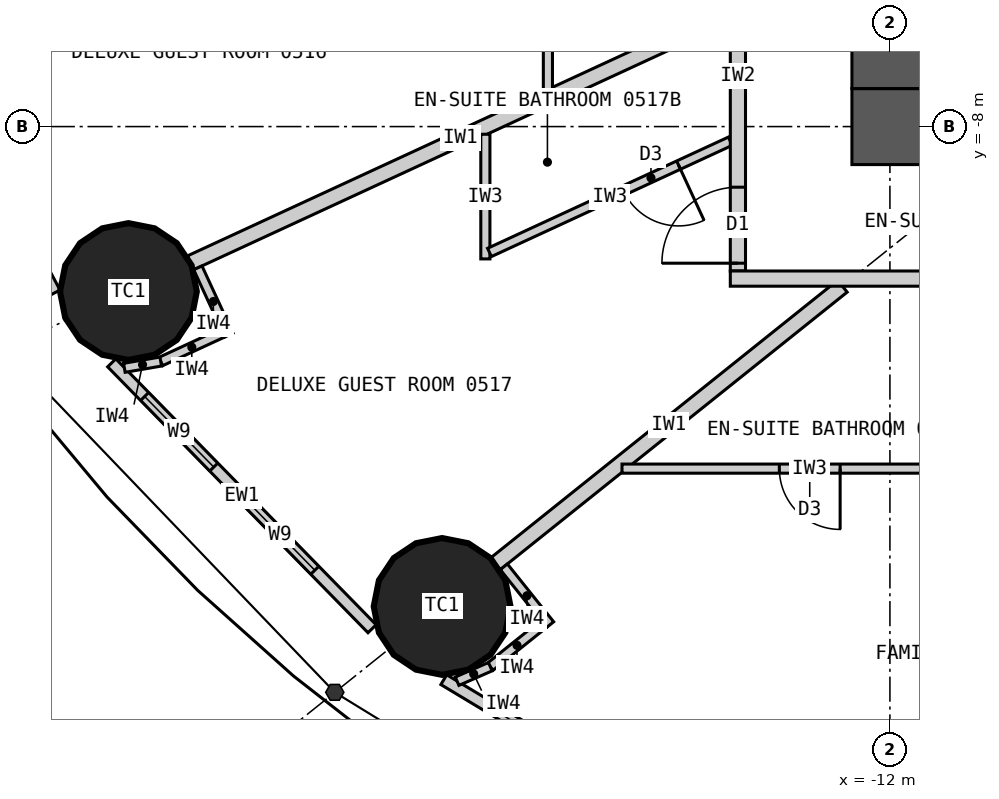
"""IFC4 building model, lengths in metres.
Left out: names, types, materials, properties, quantities, classifications, styles, units other than length and angle.
Written with IfcOpenShell. Run it as: python <this file> out.ifc"""

import sys

from ifc_helpers import new_model, si_unit, direction, frame, frame_2d, origin, origin_2d, place, context, subcontext, project, spatial, rectangle, circle, extrude, element, fill, save


model = new_model("IFC4")
c1 = context("Model", 3, precision=1e-05, world=origin(), true_north=direction((0.0, 1.0)))
c2 = subcontext(c1, "Body", "Model", "MODEL_VIEW")
j1 = project(units=[si_unit("LENGTHUNIT", "METRE"), si_unit("PLANEANGLEUNIT", "RADIAN")], contexts=[c1])
p1 = place(None, origin())
s1 = spatial("IfcSite", under=j1, at=p1, CompositionType="ELEMENT")
p2 = place(p1, origin())
s2 = spatial("IfcBuilding", under=s1, at=p2, CompositionType="ELEMENT")
p3 = place(p2, frame((0.0, 0.0, 29.4)))
s3 = spatial("IfcBuildingStorey", under=s2, at=p3, CompositionType="ELEMENT", Elevation=29.4)
for number, where, z_axis, x_axis in (
    (1, (-22.019, -10.17, 0.0), (0.0, 0.0, 1.0), (1.0, 0.0, 0.0)),
    (2, (-17.892, -14.313, 0.0), (0.0, 0.0, 1.0), (1.0, 0.0, 0.0)),
):
    element("IfcColumn", number, at=place(p3, frame(where, z_axis=z_axis, x_axis=x_axis)), inside=s3, PredefinedType="COLUMN", context=c2, shape_type="SweptSolid", body=[
        extrude(circle(Radius=0.9, at=origin_2d()), origin(), (0.0, 0.0, 1.0), 3.3),
    ])
p4 = place(p3, frame((12.5, -8.0, 0.0), z_axis=(0.0, 0.0, 1.0), x_axis=(-1.0, 0.0, 0.0)))
e3 = element("IfcWall", 3, at=p4, inside=s3, PredefinedType="SHEAR", context=c2, shape_type="SweptSolid", body=[
    extrude(rectangle(XDim=25.0, YDim=1.0, at=frame_2d((12.5, 0.0))), origin(), (0.0, 0.0, 1.0), 3.3),
])
p5 = place(p4, frame((11.2, 0.0, 0.0)))
e4 = element("IfcOpeningElement", 4, at=p5, cuts=e3, PredefinedType="OPENING", context=c2, shape_type="SweptSolid", body=[
    extrude(rectangle(XDim=1.2, YDim=2.2, at=frame_2d((0.6, 1.1))), frame((0.0, 0.51, 0.0), z_axis=(0.0, -1.0, 0.0), x_axis=(1.0, 0.0, 0.0)), (0.0, 0.0, 1.0), 1.02),
])
p6 = place(p4, frame((18.8, 0.0, 0.0)))
e5 = element("IfcOpeningElement", 5, at=p6, cuts=e3, PredefinedType="OPENING", context=c2, shape_type="SweptSolid", body=[
    extrude(rectangle(XDim=0.9, YDim=2.2, at=frame_2d((0.45, 1.1))), frame((0.0, 0.51, 0.0), z_axis=(0.0, -1.0, 0.0), x_axis=(1.0, 0.0, 0.0)), (0.0, 0.0, 1.0), 1.02),
])
p7 = place(p3, frame((-12.0, 7.5, 0.0), z_axis=(0.0, 0.0, 1.0), x_axis=(0.0, -1.0, 0.0)))
e6 = element("IfcWall", 6, at=p7, inside=s3, PredefinedType="SHEAR", context=c2, shape_type="SweptSolid", body=[
    extrude(rectangle(XDim=15.0, YDim=1.0, at=frame_2d((7.5, 0.0))), origin(), (0.0, 0.0, 1.0), 3.3),
])
p8 = place(p7, frame((6.6, 0.0, 0.0)))
e7 = element("IfcOpeningElement", 7, at=p8, cuts=e6, PredefinedType="OPENING", context=c2, shape_type="SweptSolid", body=[
    extrude(rectangle(XDim=1.8, YDim=2.2, at=frame_2d((0.9, 1.1))), frame((0.0, 0.51, 0.0), z_axis=(0.0, -1.0, 0.0), x_axis=(1.0, 0.0, 0.0)), (0.0, 0.0, 1.0), 1.02),
])
p9 = place(p3, frame((-25.139, -6.113, 0.0), z_axis=(0.0, 0.0, 1.0), x_axis=(0.467303182954, -0.884097129959, 0.0)))
e8 = element("IfcWall", 8, at=p9, inside=s3, PredefinedType="ELEMENTEDWALL", context=c2, shape_type="SweptSolid", body=[
    extrude(rectangle(XDim=4.606, YDim=0.15, at=frame_2d((2.303, 0.0))), origin(), (0.0, 0.0, 1.0), 3.12),
])
p10 = place(p9, frame((0.531, 0.0, 0.9)))
e9 = element("IfcOpeningElement", 9, at=p10, cuts=e8, PredefinedType="OPENING", context=c2, shape_type="SweptSolid", body=[
    extrude(rectangle(XDim=1.3, YDim=1.9, at=frame_2d((0.65, 0.95))), frame((0.0, 0.085, 0.0), z_axis=(0.0, -1.0, 0.0), x_axis=(1.0, 0.0, 0.0)), (0.0, 0.0, 1.0), 0.17),
])
p11 = place(p9, frame((2.432, 0.0, 0.9)))
e10 = element("IfcOpeningElement", 10, at=p11, cuts=e8, PredefinedType="OPENING", context=c2, shape_type="SweptSolid", body=[
    extrude(rectangle(XDim=1.3, YDim=1.9, at=frame_2d((0.65, 0.95))), frame((0.0, 0.085, 0.0), z_axis=(0.0, -1.0, 0.0), x_axis=(1.0, 0.0, 0.0)), (0.0, 0.0, 1.0), 0.17),
])
p12 = place(p3, frame((-22.239, -11.108, 0.0), z_axis=(0.0, 0.0, 1.0), x_axis=(0.699612594083, -0.714522370679, 0.0)))
e11 = element("IfcWall", 11, at=p12, inside=s3, PredefinedType="ELEMENTEDWALL", context=c2, shape_type="SweptSolid", body=[
    extrude(rectangle(XDim=4.896, YDim=0.15, at=frame_2d((2.448, 0.0))), origin(), (0.0, 0.0, 1.0), 3.12),
])
p13 = place(p12, frame((0.619, 0.0, 0.9)))
e12 = element("IfcOpeningElement", 12, at=p13, cuts=e11, PredefinedType="OPENING", context=c2, shape_type="SweptSolid", body=[
    extrude(rectangle(XDim=1.3, YDim=1.9, at=frame_2d((0.65, 0.95))), frame((0.0, 0.085, 0.0), z_axis=(0.0, -1.0, 0.0), x_axis=(1.0, 0.0, 0.0)), (0.0, 0.0, 1.0), 0.17),
])
p14 = place(p12, frame((2.519, 0.0, 0.9)))
e13 = element("IfcOpeningElement", 13, at=p14, cuts=e11, PredefinedType="OPENING", context=c2, shape_type="SweptSolid", body=[
    extrude(rectangle(XDim=1.3, YDim=1.9, at=frame_2d((0.65, 0.95))), frame((0.0, 0.085, 0.0), z_axis=(0.0, -1.0, 0.0), x_axis=(1.0, 0.0, 0.0)), (0.0, 0.0, 1.0), 0.17),
])
p15 = place(p3, frame((-17.869, -15.277, 0.0), z_axis=(0.0, 0.0, 1.0), x_axis=(0.856958191554, -0.515385931054, 0.0)))
e14 = element("IfcWall", 14, at=p15, inside=s3, PredefinedType="ELEMENTEDWALL", context=c2, shape_type="SweptSolid", body=[
    extrude(rectangle(XDim=5.201, YDim=0.15, at=frame_2d((2.601, 0.0))), origin(), (0.0, 0.0, 1.0), 3.12),
])
p16 = place(p15, frame((0.776, 0.0, 0.9)))
e15 = element("IfcOpeningElement", 15, at=p16, cuts=e14, PredefinedType="OPENING", context=c2, shape_type="SweptSolid", body=[
    extrude(rectangle(XDim=1.3, YDim=1.9, at=frame_2d((0.65, 0.95))), frame((0.0, 0.085, 0.0), z_axis=(0.0, -1.0, 0.0), x_axis=(1.0, 0.0, 0.0)), (0.0, 0.0, 1.0), 0.17),
])
p17 = place(p15, frame((2.676, 0.0, 0.9)))
e16 = element("IfcOpeningElement", 16, at=p17, cuts=e14, PredefinedType="OPENING", context=c2, shape_type="SweptSolid", body=[
    extrude(rectangle(XDim=1.3, YDim=1.9, at=frame_2d((0.65, 0.95))), frame((0.0, 0.085, 0.0), z_axis=(0.0, -1.0, 0.0), x_axis=(1.0, 0.0, 0.0)), (0.0, 0.0, 1.0), 0.17),
])
p18 = place(p3, frame((-14.1, -6.512, 0.0), z_axis=(0.0, 0.0, 1.0), x_axis=(-0.907842433118, -0.41931147925, 0.0)))
e17 = element("IfcWall", 17, at=p18, inside=s3, PredefinedType="PARTITIONING", context=c2, shape_type="SweptSolid", body=[
    extrude(rectangle(XDim=7.823, YDim=0.2, at=frame_2d((3.912, 0.0))), origin(), (0.0, 0.0, 1.0), 2.32),
])
p19 = place(p3, frame((-12.625, -10.1, 0.0), z_axis=(0.0, 0.0, 1.0), x_axis=(-0.780872884676, -0.624689953479, 0.0)))
e18 = element("IfcWall", 18, at=p19, inside=s3, PredefinedType="PARTITIONING", context=c2, shape_type="SweptSolid", body=[
    extrude(rectangle(XDim=5.845, YDim=0.2, at=frame_2d((2.922, 0.0))), origin(), (0.0, 0.0, 1.0), 2.32),
])
p20 = place(p3, frame((-16.5, -7.521, 0.0), z_axis=(0.0, 0.0, 1.0), x_axis=(0.0, 1.0, 0.0)))
e19 = element("IfcWall", 19, at=p20, inside=s3, PredefinedType="PARTITIONING", context=c2, shape_type="SweptSolid", body=[
    extrude(rectangle(XDim=2.749, YDim=0.12, at=frame_2d((1.374, 0.0))), origin(), (0.0, 0.0, 1.0), 3.12),
])
p21 = place(p3, frame((-17.323, -8.101, 0.0), z_axis=(0.0, 0.0, 1.0), x_axis=(0.0, -1.0, 0.0)))
e20 = element("IfcWall", 20, at=p21, inside=s3, PredefinedType="PARTITIONING", context=c2, shape_type="SweptSolid", body=[
    extrude(rectangle(XDim=1.64, YDim=0.12, at=frame_2d((0.82, 0.0))), origin(), (0.0, 0.0, 1.0), 3.12),
])
p22 = place(p3, frame((-14.1, -8.193, 0.0), z_axis=(0.0, 0.0, 1.0), x_axis=(-0.907836493557, -0.419324338628, 0.0)))
e21 = element("IfcWall", 21, at=p22, inside=s3, PredefinedType="PARTITIONING", context=c2, shape_type="SweptSolid", body=[
    extrude(rectangle(XDim=3.49, YDim=0.12, at=frame_2d((1.745, 0.0))), origin(), (0.0, 0.0, 1.0), 3.12),
])
p23 = place(p22, frame((0.75, 0.0, 0.0)))
e22 = element("IfcOpeningElement", 22, at=p23, cuts=e21, PredefinedType="OPENING", context=c2, shape_type="SweptSolid", body=[
    extrude(rectangle(XDim=0.8, YDim=2.1, at=frame_2d((0.4, 1.05))), frame((0.0, 0.07, 0.0), z_axis=(0.0, -1.0, 0.0), x_axis=(1.0, 0.0, 0.0)), (0.0, 0.0, 1.0), 0.14),
])
p24 = place(p3, frame((-15.525, -12.5, 0.0), z_axis=(0.0, 0.0, 1.0), x_axis=(1.0, 0.0, 0.0)))
e23 = element("IfcWall", 23, at=p24, inside=s3, PredefinedType="PARTITIONING", context=c2, shape_type="SweptSolid", body=[
    extrude(rectangle(XDim=4.94, YDim=0.12, at=frame_2d((2.47, 0.0))), origin(), (0.0, 0.0, 1.0), 3.12),
])
p25 = place(p24, frame((2.07, 0.0, 0.0)))
e24 = element("IfcOpeningElement", 24, at=p25, cuts=e23, PredefinedType="OPENING", context=c2, shape_type="SweptSolid", body=[
    extrude(rectangle(XDim=0.8, YDim=2.1, at=frame_2d((0.4, 1.05))), frame((0.0, 0.07, 0.0), z_axis=(0.0, -1.0, 0.0), x_axis=(1.0, 0.0, 0.0)), (0.0, 0.0, 1.0), 0.14),
])
p26 = place(p3, frame((-14.0, -4.772, 0.0), z_axis=(0.0, 0.0, 1.0), x_axis=(0.0, -1.0, 0.0)))
e25 = element("IfcWall", 25, at=p26, inside=s3, PredefinedType="PARTITIONING", context=c2, shape_type="SweptSolid", body=[
    extrude(rectangle(XDim=5.127, YDim=0.2, at=frame_2d((2.564, 0.0))), origin(), (0.0, 0.0, 1.0), 3.12),
])
p27 = place(p26, frame((4.025, 0.0, 0.0)))
e26 = element("IfcOpeningElement", 26, at=p27, cuts=e25, PredefinedType="OPENING", context=c2, shape_type="SweptSolid", body=[
    extrude(rectangle(XDim=1.0, YDim=2.2, at=frame_2d((0.5, 1.1))), frame((0.0, 0.11, 0.0), z_axis=(0.0, -1.0, 0.0), x_axis=(1.0, 0.0, 0.0)), (0.0, 0.0, 1.0), 0.22),
])
p28 = place(p3, frame((-3.499, -10.0, 0.0), z_axis=(0.0, 0.0, 1.0), x_axis=(-1.0, 0.0, 0.0)))
e27 = element("IfcWall", 27, at=p28, inside=s3, PredefinedType="PARTITIONING", context=c2, shape_type="SweptSolid", body=[
    extrude(rectangle(XDim=10.602, YDim=0.2, at=frame_2d((5.301, 0.0))), origin(), (0.0, 0.0, 1.0), 3.12),
])
p29 = place(p28, frame((4.846, 0.0, 0.0)))
e28 = element("IfcOpeningElement", 28, at=p29, cuts=e27, PredefinedType="OPENING", context=c2, shape_type="SweptSolid", body=[
    extrude(rectangle(XDim=1.0, YDim=2.2, at=frame_2d((0.5, 1.1))), frame((0.0, 0.11, 0.0), z_axis=(0.0, -1.0, 0.0), x_axis=(1.0, 0.0, 0.0)), (0.0, 0.0, 1.0), 0.22),
])
p30 = place(p3, frame((-21.106, -9.858, 0.0), z_axis=(0.0, 0.0, 1.0), x_axis=(0.419344098106, -0.907827366509, 0.0)))
e29 = element("IfcWall", 29, at=p30, inside=s3, PredefinedType="PARTITIONING", context=c2, shape_type="SweptSolid", body=[
    extrude(rectangle(XDim=0.975, YDim=0.12, at=frame_2d((0.487, 0.0))), origin(), (0.0, 0.0, 1.0), 3.12),
])
p31 = place(p3, frame((-20.777, -10.714, 0.0), z_axis=(0.0, 0.0, 1.0), x_axis=(-0.907832324198, -0.419333365166, 0.0)))
e30 = element("IfcWall", 30, at=p31, inside=s3, PredefinedType="PARTITIONING", context=c2, shape_type="SweptSolid", body=[
    extrude(rectangle(XDim=0.9, YDim=0.12, at=frame_2d((0.45, 0.0))), origin(), (0.0, 0.0, 1.0), 3.12),
])
p32 = place(p3, frame((-21.594, -11.091, 0.0), z_axis=(0.0, 0.0, 1.0), x_axis=(-0.985483306792, -0.169772353566, 0.0)))
e31 = element("IfcWall", 31, at=p32, inside=s3, PredefinedType="PARTITIONING", context=c2, shape_type="SweptSolid", body=[
    extrude(rectangle(XDim=0.486, YDim=0.12, at=frame_2d((0.243, 0.0))), origin(), (0.0, 0.0, 1.0), 3.12),
])
p33 = place(p3, frame((-17.08, -13.792, 0.0), z_axis=(0.0, 0.0, 1.0), x_axis=(0.624756144097, -0.780819928289, 0.0)))
e32 = element("IfcWall", 32, at=p33, inside=s3, PredefinedType="PARTITIONING", context=c2, shape_type="SweptSolid", body=[
    extrude(rectangle(XDim=0.975, YDim=0.12, at=frame_2d((0.487, 0.0))), origin(), (0.0, 0.0, 1.0), 3.12),
])
p34 = place(p3, frame((-16.555, -14.543, 0.0), z_axis=(0.0, 0.0, 1.0), x_axis=(-0.780789399477, -0.62479429708, 0.0)))
e33 = element("IfcWall", 33, at=p34, inside=s3, PredefinedType="PARTITIONING", context=c2, shape_type="SweptSolid", body=[
    extrude(rectangle(XDim=0.9, YDim=0.12, at=frame_2d((0.45, 0.0))), origin(), (0.0, 0.0, 1.0), 3.12),
])
p35 = place(p3, frame((-17.258, -15.106, 0.0), z_axis=(0.0, 0.0, 1.0), x_axis=(-0.916098562583, -0.400953143937, 0.0)))
e34 = element("IfcWall", 34, at=p35, inside=s3, PredefinedType="PARTITIONING", context=c2, shape_type="SweptSolid", body=[
    extrude(rectangle(XDim=0.477, YDim=0.12, at=frame_2d((0.238, 0.0))), origin(), (0.0, 0.0, 1.0), 3.12),
])
p36 = place(p13, origin())
e35 = element("IfcWindow", 35, at=p36, inside=s3, PartitioningType="SINGLE_PANEL", PredefinedType="WINDOW", context=c2, shape_type="SweptSolid", body=[
    extrude(rectangle(XDim=1.3, YDim=1.9, at=frame_2d((0.65, 0.95))), frame((0.0, 0.03, 0.0), z_axis=(0.0, -1.0, 0.0), x_axis=(1.0, 0.0, 0.0)), (0.0, 0.0, 1.0), 0.06),
])
fill(e12, e35)
p37 = place(p14, origin())
e36 = element("IfcWindow", 36, at=p37, inside=s3, PartitioningType="SINGLE_PANEL", PredefinedType="WINDOW", context=c2, shape_type="SweptSolid", body=[
    extrude(rectangle(XDim=1.3, YDim=1.9, at=frame_2d((0.65, 0.95))), frame((0.0, 0.03, 0.0), z_axis=(0.0, -1.0, 0.0), x_axis=(1.0, 0.0, 0.0)), (0.0, 0.0, 1.0), 0.06),
])
fill(e13, e36)
p38 = place(p16, origin())
e37 = element("IfcWindow", 37, at=p38, inside=s3, PartitioningType="SINGLE_PANEL", PredefinedType="WINDOW", context=c2, shape_type="SweptSolid", body=[
    extrude(rectangle(XDim=1.3, YDim=1.9, at=frame_2d((0.65, 0.95))), frame((0.0, 0.03, 0.0), z_axis=(0.0, -1.0, 0.0), x_axis=(1.0, 0.0, 0.0)), (0.0, 0.0, 1.0), 0.06),
])
fill(e15, e37)
p39 = place(p23, origin())
e38 = element("IfcDoor", 38, at=p39, inside=s3, OperationType="SINGLE_SWING_LEFT", PredefinedType="DOOR", context=c2, shape_type="SweptSolid", body=[
    extrude(rectangle(XDim=0.8, YDim=2.1, at=frame_2d((0.4, 1.05))), frame((0.0, 0.025, 0.0), z_axis=(0.0, -1.0, 0.0), x_axis=(1.0, 0.0, 0.0)), (0.0, 0.0, 1.0), 0.05),
])
fill(e22, e38)
p40 = place(p27, origin())
e39 = element("IfcDoor", 39, at=p40, inside=s3, OperationType="SINGLE_SWING_RIGHT", PredefinedType="DOOR", context=c2, shape_type="SweptSolid", body=[
    extrude(rectangle(XDim=1.0, YDim=2.2, at=frame_2d((0.5, 1.1))), frame((0.0, 0.025, 0.0), z_axis=(0.0, -1.0, 0.0), x_axis=(1.0, 0.0, 0.0)), (0.0, 0.0, 1.0), 0.05),
])
fill(e26, e39)
p41 = place(p25, origin())
e40 = element("IfcDoor", 40, at=p41, inside=s3, OperationType="SINGLE_SWING_RIGHT", PredefinedType="DOOR", context=c2, shape_type="SweptSolid", body=[
    extrude(rectangle(XDim=0.8, YDim=2.1, at=frame_2d((0.4, 1.05))), frame((0.0, 0.025, 0.0), z_axis=(0.0, -1.0, 0.0), x_axis=(1.0, 0.0, 0.0)), (0.0, 0.0, 1.0), 0.05),
])
fill(e24, e40)
save(model, sys.argv[1])
